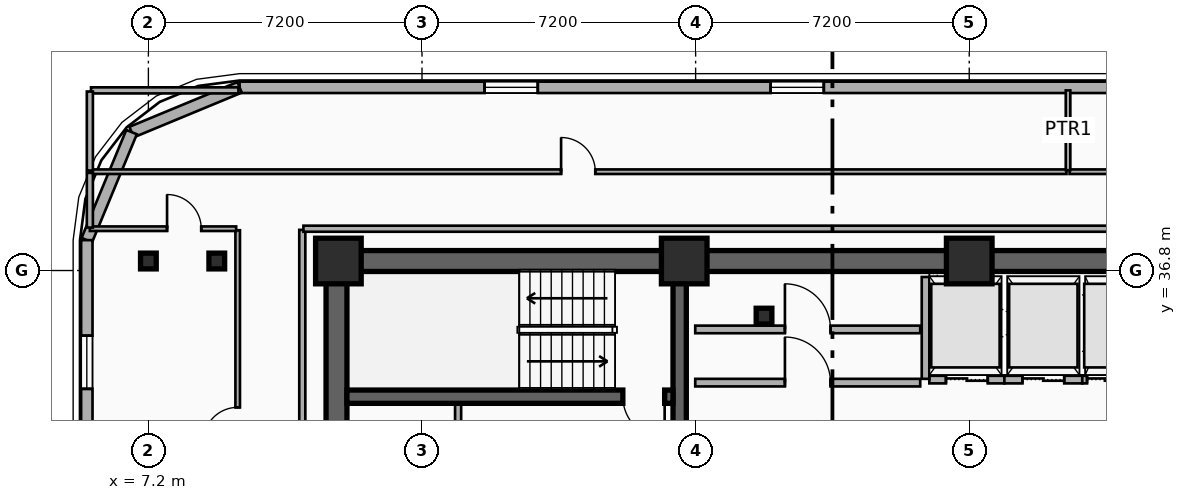
"""IFC4 building model, lengths in metres.
Left out: names, types, materials, properties, quantities, classifications, styles, units other than length and angle.
Written with IfcOpenShell. Run it as: python <this file> out.ifc"""

import sys

from ifc_helpers import new_model, si_unit, direction, frame, frame_2d, origin, origin_2d, place, context, subcontext, project, spatial, rectangle, i_section, extrude, element, fill, save


model = new_model("IFC4")
c1 = context("Model", 3, precision=1e-05, world=origin(), true_north=direction((0.0, 1.0)))
c2 = subcontext(c1, "Body", "Model", "MODEL_VIEW")
j1 = project(units=[si_unit("LENGTHUNIT", "METRE"), si_unit("PLANEANGLEUNIT", "RADIAN")], contexts=[c1])
p1 = place(None, origin())
s1 = spatial("IfcSite", under=j1, at=p1, CompositionType="ELEMENT")
p2 = place(p1, origin())
s2 = spatial("IfcBuilding", under=s1, at=p2, CompositionType="ELEMENT")
p3 = place(p2, frame((0.0, 0.0, 173.2)))
s3 = spatial("IfcBuildingStorey", under=s2, at=p3, CompositionType="ELEMENT", Elevation=173.2)
p4 = place(p3, frame((12.15, 37.05, 0.0), z_axis=(0.0, 0.0, 1.0), x_axis=(1.0, 0.0, 0.0)))
e1 = element("IfcWall", 1, at=p4, inside=s3, PredefinedType="SHEAR", context=c2, shape_type="SweptSolid", body=[
    extrude(rectangle(XDim=33.23, YDim=0.55, at=frame_2d((16.615, 0.0))), origin(), (0.0, 0.0, 1.0), 3.55),
])
p5 = place(p3, frame((12.15, 28.095, 0.0), z_axis=(0.0, 0.0, 1.0), x_axis=(0.0, 1.0, 0.0)))
e2 = element("IfcWall", 2, at=p5, inside=s3, PredefinedType="SHEAR", context=c2, shape_type="SweptSolid", body=[
    extrude(rectangle(XDim=8.68, YDim=0.55, at=frame_2d((4.34, 0.0))), origin(), (0.0, 0.0, 1.0), 3.55),
])
p6 = place(p3, frame((21.18, 28.095, 0.0), z_axis=(0.0, 0.0, 1.0), x_axis=(0.0, 1.0, 0.0)))
e3 = element("IfcWall", 3, at=p6, inside=s3, PredefinedType="SHEAR", context=c2, shape_type="SweptSolid", body=[
    extrude(rectangle(XDim=8.68, YDim=0.35, at=frame_2d((4.34, 0.0))), origin(), (0.0, 0.0, 1.0), 3.55),
])
p7 = place(p3, frame((21.005, 33.48, 0.0), z_axis=(0.0, 0.0, 1.0), x_axis=(-1.0, 0.0, 0.0)))
e4 = element("IfcWall", 4, at=p7, inside=s3, PredefinedType="SHEAR", context=c2, shape_type="SweptSolid", body=[
    extrude(rectangle(XDim=8.58, YDim=0.35, at=frame_2d((4.29, 0.0))), origin(), (0.0, 0.0, 1.0), 3.55),
])
p8 = place(p7, frame((0.22, 0.0, 0.0)))
e5 = element("IfcOpeningElement", 5, at=p8, cuts=e4, PredefinedType="OPENING", context=c2, shape_type="SweptSolid", body=[
    extrude(rectangle(XDim=1.1, YDim=2.15, at=frame_2d((0.55, 1.075))), frame((0.0, 0.185, 0.0), z_axis=(0.0, -1.0, 0.0), x_axis=(1.0, 0.0, 0.0)), (0.0, 0.0, 1.0), 0.37),
])
p9 = place(p3, frame((23.4, 35.6, 0.0), z_axis=(0.0, 0.0, 1.0), x_axis=(1.0, 0.0, 0.0)))
e6 = element("IfcColumn", 6, at=p9, inside=s3, PredefinedType="COLUMN", context=c2, shape_type="SweptSolid", body=[
    extrude(i_section(OverallWidth=0.413, OverallDepth=0.415, WebThickness=0.03, FlangeThickness=0.047, FilletRadius=0.015, at=origin_2d()), origin(), (0.0, 0.0, 1.0), 3.55),
])
for number, where, z_axis, x_axis in (
    (7, (12.2, 37.05, 0.0), (0.0, 0.0, 1.0), (1.0, 0.0, 0.0)),
    (8, (21.3, 37.05, 0.0), (0.0, 0.0, 1.0), (1.0, 0.0, 0.0)),
    (9, (28.8, 37.05, 0.0), (0.0, 0.0, 1.0), (1.0, 0.0, 0.0)),
):
    element("IfcColumn", number, at=place(p3, frame(where, z_axis=z_axis, x_axis=x_axis)), inside=s3, PredefinedType="COLUMN", context=c2, shape_type="SweptSolid", body=[
        extrude(rectangle(XDim=1.2, YDim=1.2, at=origin_2d()), origin(), (0.0, 0.0, 1.0), 3.55),
    ])
for number, where, z_axis, x_axis in (
    (10, (9.0, 37.05, 0.0), (0.0, 0.0, 1.0), (1.0, 0.0, 0.0)),
    (11, (7.2, 37.05, 0.0), (0.0, 0.0, 1.0), (1.0, 0.0, 0.0)),
):
    element("IfcColumn", number, at=place(p3, frame(where, z_axis=z_axis, x_axis=x_axis)), inside=s3, PredefinedType="COLUMN", context=c2, shape_type="SweptSolid", body=[
        extrude(i_section(OverallWidth=0.413, OverallDepth=0.415, WebThickness=0.03, FlangeThickness=0.047, FilletRadius=0.015, at=origin_2d()), origin(), (0.0, 0.0, 1.0), 3.55),
    ])
p10 = place(p3, frame((9.6, 41.62, 0.0), z_axis=(0.0, 0.0, 1.0), x_axis=(1.0, 0.0, 0.0)))
e12 = element("IfcWall", 12, at=p10, inside=s3, PredefinedType="SOLIDWALL", context=c2, shape_type="SweptSolid", body=[
    extrude(rectangle(XDim=38.4, YDim=0.3, at=frame_2d((19.2, 0.0))), origin(), (0.0, 0.0, 1.0), 3.29),
])
p11 = place(p10, frame((6.447, 0.0, 0.75)))
e13 = element("IfcOpeningElement", 13, at=p11, cuts=e12, PredefinedType="OPENING", context=c2, shape_type="SweptSolid", body=[
    extrude(rectangle(XDim=1.4, YDim=2.1, at=frame_2d((0.7, 1.05))), frame((0.0, 0.16, 0.0), z_axis=(0.0, -1.0, 0.0), x_axis=(1.0, 0.0, 0.0)), (0.0, 0.0, 1.0), 0.32),
])
p12 = place(p10, frame((13.973, 0.0, 0.75)))
e14 = element("IfcOpeningElement", 14, at=p12, cuts=e12, PredefinedType="OPENING", context=c2, shape_type="SweptSolid", body=[
    extrude(rectangle(XDim=1.4, YDim=2.1, at=frame_2d((0.7, 1.05))), frame((0.0, 0.16, 0.0), z_axis=(0.0, -1.0, 0.0), x_axis=(1.0, 0.0, 0.0)), (0.0, 0.0, 1.0), 0.32),
])
p13 = place(p10, frame((26.493, 0.0, 0.75)))
e15 = element("IfcOpeningElement", 15, at=p13, cuts=e12, PredefinedType="OPENING", context=c2, shape_type="SweptSolid", body=[
    extrude(rectangle(XDim=1.4, YDim=2.1, at=frame_2d((0.7, 1.05))), frame((0.0, 0.16, 0.0), z_axis=(0.0, -1.0, 0.0), x_axis=(1.0, 0.0, 0.0)), (0.0, 0.0, 1.0), 0.32),
])
p14 = place(p10, frame((32.287, 0.0, 0.75)))
e16 = element("IfcOpeningElement", 16, at=p14, cuts=e12, PredefinedType="OPENING", context=c2, shape_type="SweptSolid", body=[
    extrude(rectangle(XDim=1.4, YDim=2.1, at=frame_2d((0.7, 1.05))), frame((0.0, 0.16, 0.0), z_axis=(0.0, -1.0, 0.0), x_axis=(1.0, 0.0, 0.0)), (0.0, 0.0, 1.0), 0.32),
])
p15 = place(p3, frame((6.757, 40.443, 0.0), z_axis=(0.0, 0.0, 1.0), x_axis=(0.923882414032, 0.382676475685, 0.0)))
e17 = element("IfcWall", 17, at=p15, inside=s3, PredefinedType="SOLIDWALL", context=c2, shape_type="SweptSolid", body=[
    extrude(rectangle(XDim=3.077, YDim=0.3, at=frame_2d((1.539, 0.0))), origin(), (0.0, 0.0, 1.0), 3.29),
])
p16 = place(p3, frame((5.58, 37.6, 0.0), z_axis=(0.0, 0.0, 1.0), x_axis=(0.382636798336, 0.92389884758, 0.0)))
e18 = element("IfcWall", 18, at=p16, inside=s3, PredefinedType="SOLIDWALL", context=c2, shape_type="SweptSolid", body=[
    extrude(rectangle(XDim=3.077, YDim=0.3, at=frame_2d((1.538, 0.0))), origin(), (0.0, 0.0, 1.0), 3.29),
])
p17 = place(p3, frame((5.58, 14.6, 0.0), z_axis=(0.0, 0.0, 1.0), x_axis=(0.0, 1.0, 0.0)))
e19 = element("IfcWall", 19, at=p17, inside=s3, PredefinedType="SOLIDWALL", context=c2, shape_type="SweptSolid", body=[
    extrude(rectangle(XDim=23.0, YDim=0.3, at=frame_2d((11.5, 0.0))), origin(), (0.0, 0.0, 1.0), 3.29),
])
p18 = place(p17, frame((15.493, 0.0, 0.34)))
e20 = element("IfcOpeningElement", 20, at=p18, cuts=e19, PredefinedType="OPENING", context=c2, shape_type="SweptSolid", body=[
    extrude(rectangle(XDim=1.4, YDim=2.1, at=frame_2d((0.7, 1.05))), frame((0.0, 0.16, 0.0), z_axis=(0.0, -1.0, 0.0), x_axis=(1.0, 0.0, 0.0)), (0.0, 0.0, 1.0), 0.32),
])
p19 = place(p17, frame((19.087, 0.0, 0.34)))
e21 = element("IfcOpeningElement", 21, at=p19, cuts=e19, PredefinedType="OPENING", context=c2, shape_type="SweptSolid", body=[
    extrude(rectangle(XDim=1.4, YDim=2.1, at=frame_2d((0.7, 1.05))), frame((0.0, 0.16, 0.0), z_axis=(0.0, -1.0, 0.0), x_axis=(1.0, 0.0, 0.0)), (0.0, 0.0, 1.0), 0.32),
])
p20 = place(p17, frame((2.83, 0.0, 0.34)))
e22 = element("IfcOpeningElement", 22, at=p20, cuts=e19, PredefinedType="OPENING", context=c2, shape_type="SweptSolid", body=[
    extrude(rectangle(XDim=1.4, YDim=2.1, at=frame_2d((0.7, 1.05))), frame((0.0, 0.16, 0.0), z_axis=(0.0, -1.0, 0.0), x_axis=(1.0, 0.0, 0.0)), (0.0, 0.0, 1.0), 0.32),
])
p21 = place(p17, frame((6.74, 0.0, 0.34)))
e23 = element("IfcOpeningElement", 23, at=p21, cuts=e19, PredefinedType="OPENING", context=c2, shape_type="SweptSolid", body=[
    extrude(rectangle(XDim=1.4, YDim=2.1, at=frame_2d((0.7, 1.05))), frame((0.0, 0.16, 0.0), z_axis=(0.0, -1.0, 0.0), x_axis=(1.0, 0.0, 0.0)), (0.0, 0.0, 1.0), 0.32),
])
p22 = place(p3, frame((27.75, 33.93, 0.0), z_axis=(0.0, 0.0, 1.0), x_axis=(1.0, 0.0, 0.0)))
e24 = element("IfcWall", 24, at=p22, inside=s3, PredefinedType="PARTITIONING", context=c2, shape_type="SweptSolid", body=[
    extrude(rectangle(XDim=1.975, YDim=0.2, at=frame_2d((0.988, 0.0))), origin(), (0.0, 0.0, 1.0), 2.36),
])
p23 = place(p22, frame((0.438, 0.0, 0.0)))
e25 = element("IfcOpeningElement", 25, at=p23, cuts=e24, PredefinedType="OPENING", context=c2, shape_type="SweptSolid", body=[
    extrude(rectangle(XDim=1.1, YDim=2.15, at=frame_2d((0.55, 1.075))), frame((0.0, 0.11, 0.0), z_axis=(0.0, -1.0, 0.0), x_axis=(1.0, 0.0, 0.0)), (0.0, 0.0, 1.0), 0.22),
])
p24 = place(p3, frame((27.65, 33.95, 0.0), z_axis=(0.0, 0.0, 1.0), x_axis=(0.0, 1.0, 0.0)))
e26 = element("IfcWall", 26, at=p24, inside=s3, PredefinedType="PARTITIONING", context=c2, shape_type="SweptSolid", body=[
    extrude(rectangle(XDim=2.68, YDim=0.2, at=frame_2d((1.34, 0.0))), origin(), (0.0, 0.0, 1.0), 2.36),
])
p25 = place(p3, frame((29.725, 33.93, 0.0), z_axis=(0.0, 0.0, 1.0), x_axis=(1.0, 0.0, 0.0)))
e27 = element("IfcWall", 27, at=p25, inside=s3, PredefinedType="PARTITIONING", context=c2, shape_type="SweptSolid", body=[
    extrude(rectangle(XDim=2.05, YDim=0.2, at=frame_2d((1.025, 0.0))), origin(), (0.0, 0.0, 1.0), 3.29),
])
p26 = place(p25, frame((0.475, 0.0, 0.0)))
e28 = element("IfcOpeningElement", 28, at=p26, cuts=e27, PredefinedType="OPENING", context=c2, shape_type="SweptSolid", body=[
    extrude(rectangle(XDim=1.1, YDim=2.15, at=frame_2d((0.55, 1.075))), frame((0.0, 0.11, 0.0), z_axis=(0.0, -1.0, 0.0), x_axis=(1.0, 0.0, 0.0)), (0.0, 0.0, 1.0), 0.22),
])
p27 = place(p3, frame((31.775, 33.93, 0.0), z_axis=(0.0, 0.0, 1.0), x_axis=(1.0, 0.0, 0.0)))
e29 = element("IfcWall", 29, at=p27, inside=s3, PredefinedType="PARTITIONING", context=c2, shape_type="SweptSolid", body=[
    extrude(rectangle(XDim=1.2, YDim=0.2, at=frame_2d((0.6, 0.0))), origin(), (0.0, 0.0, 1.0), 3.29),
])
p28 = place(p27, frame((0.125, 0.0, 0.0)))
e30 = element("IfcOpeningElement", 30, at=p28, cuts=e29, PredefinedType="OPENING", context=c2, shape_type="SweptSolid", body=[
    extrude(rectangle(XDim=0.95, YDim=2.15, at=frame_2d((0.475, 1.075))), frame((0.0, 0.11, 0.0), z_axis=(0.0, -1.0, 0.0), x_axis=(1.0, 0.0, 0.0)), (0.0, 0.0, 1.0), 0.22),
])
p29 = place(p3, frame((21.59, 33.85, 0.0), z_axis=(0.0, 0.0, 1.0), x_axis=(1.0, 0.0, 0.0)))
e31 = element("IfcWall", 31, at=p29, inside=s3, PredefinedType="PARTITIONING", context=c2, shape_type="SweptSolid", body=[
    extrude(rectangle(XDim=5.92, YDim=0.2, at=frame_2d((2.96, 0.0))), origin(), (0.0, 0.0, 1.0), 2.36),
])
p30 = place(p29, frame((2.36, 0.0, 0.0)))
e32 = element("IfcOpeningElement", 32, at=p30, cuts=e31, PredefinedType="OPENING", context=c2, shape_type="SweptSolid", body=[
    extrude(rectangle(XDim=1.2, YDim=2.15, at=frame_2d((0.6, 1.075))), frame((0.0, 0.11, 0.0), z_axis=(0.0, -1.0, 0.0), x_axis=(1.0, 0.0, 0.0)), (0.0, 0.0, 1.0), 0.22),
])
p31 = place(p3, frame((21.59, 35.25, 0.0), z_axis=(0.0, 0.0, 1.0), x_axis=(1.0, 0.0, 0.0)))
e33 = element("IfcWall", 33, at=p31, inside=s3, PredefinedType="PARTITIONING", context=c2, shape_type="SweptSolid", body=[
    extrude(rectangle(XDim=5.92, YDim=0.2, at=frame_2d((2.96, 0.0))), origin(), (0.0, 0.0, 1.0), 2.36),
])
p32 = place(p31, frame((2.36, 0.0, 0.0)))
e34 = element("IfcOpeningElement", 34, at=p32, cuts=e33, PredefinedType="OPENING", context=c2, shape_type="SweptSolid", body=[
    extrude(rectangle(XDim=1.2, YDim=2.15, at=frame_2d((0.6, 1.075))), frame((0.0, 0.11, 0.0), z_axis=(0.0, -1.0, 0.0), x_axis=(1.0, 0.0, 0.0)), (0.0, 0.0, 1.0), 0.22),
])
p33 = place(p3, frame((9.55, 27.64, 0.0), z_axis=(0.0, 0.0, 1.0), x_axis=(0.0, 1.0, 0.0)))
e35 = element("IfcWall", 35, at=p33, inside=s3, PredefinedType="PARTITIONING", context=c2, shape_type="SweptSolid", body=[
    extrude(rectangle(XDim=10.22, YDim=0.12, at=frame_2d((5.11, 0.0))), origin(), (0.0, 0.0, 1.0), 2.77),
])
p34 = place(p33, frame((4.66, 0.0, 0.0)))
e36 = element("IfcOpeningElement", 36, at=p34, cuts=e35, PredefinedType="OPENING", context=c2, shape_type="SweptSolid", body=[
    extrude(rectangle(XDim=0.9, YDim=2.1, at=frame_2d((0.45, 1.05))), frame((0.0, 0.07, 0.0), z_axis=(0.0, -1.0, 0.0), x_axis=(1.0, 0.0, 0.0)), (0.0, 0.0, 1.0), 0.14),
])
p35 = place(p3, frame((5.66, 37.9, 0.0), z_axis=(0.0, 0.0, 1.0), x_axis=(1.0, 0.0, 0.0)))
e37 = element("IfcWall", 37, at=p35, inside=s3, PredefinedType="PARTITIONING", context=c2, shape_type="SweptSolid", body=[
    extrude(rectangle(XDim=3.85, YDim=0.12, at=frame_2d((1.925, 0.0))), origin(), (0.0, 0.0, 1.0), 3.29),
])
p36 = place(p35, frame((2.031, 0.0, 0.0)))
e38 = element("IfcOpeningElement", 38, at=p36, cuts=e37, PredefinedType="OPENING", context=c2, shape_type="SweptSolid", body=[
    extrude(rectangle(XDim=0.9, YDim=2.1, at=frame_2d((0.45, 1.05))), frame((0.0, 0.07, 0.0), z_axis=(0.0, -1.0, 0.0), x_axis=(1.0, 0.0, 0.0)), (0.0, 0.0, 1.0), 0.14),
])
p37 = place(p3, frame((5.66, 39.4, 0.0), z_axis=(0.0, 0.0, 1.0), x_axis=(1.0, 0.0, 0.0)))
e39 = element("IfcWall", 39, at=p37, inside=s3, PredefinedType="PARTITIONING", context=c2, shape_type="SweptSolid", body=[
    extrude(rectangle(XDim=25.7, YDim=0.12, at=frame_2d((12.85, 0.0))), origin(), (0.0, 0.0, 1.0), 3.29),
])
p38 = place(p37, frame((12.4, 0.0, 0.0)))
e40 = element("IfcOpeningElement", 40, at=p38, cuts=e39, PredefinedType="OPENING", context=c2, shape_type="SweptSolid", body=[
    extrude(rectangle(XDim=0.9, YDim=2.1, at=frame_2d((0.45, 1.05))), frame((0.0, 0.07, 0.0), z_axis=(0.0, -1.0, 0.0), x_axis=(1.0, 0.0, 0.0)), (0.0, 0.0, 1.0), 0.14),
])
p39 = place(p3, frame((31.44, 39.4, 0.0), z_axis=(0.0, 0.0, 1.0), x_axis=(1.0, 0.0, 0.0)))
e41 = element("IfcWall", 41, at=p39, inside=s3, PredefinedType="PARTITIONING", context=c2, shape_type="SweptSolid", body=[
    extrude(rectangle(XDim=20.5, YDim=0.12, at=frame_2d((10.25, 0.0))), origin(), (0.0, 0.0, 1.0), 3.29),
])
p40 = place(p39, frame((9.8, 0.0, 0.0)))
e42 = element("IfcOpeningElement", 42, at=p40, cuts=e41, PredefinedType="OPENING", context=c2, shape_type="SweptSolid", body=[
    extrude(rectangle(XDim=0.9, YDim=2.1, at=frame_2d((0.45, 1.05))), frame((0.0, 0.07, 0.0), z_axis=(0.0, -1.0, 0.0), x_axis=(1.0, 0.0, 0.0)), (0.0, 0.0, 1.0), 0.14),
])
p41 = place(p3, frame((31.4, 39.44, 0.0), z_axis=(0.0, 0.0, 1.0), x_axis=(0.0, 1.0, 0.0)))
e43 = element("IfcWall", 43, at=p41, inside=s3, PredefinedType="PARTITIONING", context=c2, shape_type="SweptSolid", body=[
    extrude(rectangle(XDim=2.1, YDim=0.12, at=frame_2d((1.05, 0.0))), origin(), (0.0, 0.0, 1.0), 3.29),
])
p42 = place(p3, frame((15.35, 30.96, 0.0), z_axis=(0.0, 0.0, 1.0), x_axis=(0.0, 1.0, 0.0)))
e44 = element("IfcWall", 44, at=p42, inside=s3, PredefinedType="PARTITIONING", context=c2, shape_type="SweptSolid", body=[
    extrude(rectangle(XDim=2.31, YDim=0.16, at=frame_2d((1.155, 0.0))), origin(), (0.0, 0.0, 1.0), 3.29),
])
p43 = place(p3, frame((11.25, 27.63, 0.0), z_axis=(0.0, 0.0, 1.0), x_axis=(0.0, 1.0, 0.0)))
e45 = element("IfcWall", 45, at=p43, inside=s3, PredefinedType="PARTITIONING", context=c2, shape_type="SweptSolid", body=[
    extrude(rectangle(XDim=10.24, YDim=0.16, at=frame_2d((5.12, 0.0))), origin(), (0.0, 0.0, 1.0), 2.77),
])
p44 = place(p3, frame((11.28, 37.9, 0.0), z_axis=(0.0, 0.0, 1.0), x_axis=(1.0, 0.0, 0.0)))
e46 = element("IfcWall", 46, at=p44, inside=s3, PredefinedType="PARTITIONING", context=c2, shape_type="SweptSolid", body=[
    extrude(rectangle(XDim=35.04, YDim=0.16, at=frame_2d((17.52, 0.0))), origin(), (0.0, 0.0, 1.0), 3.29),
])
p45 = place(p3, frame((5.66, 37.93, 0.0), z_axis=(0.0, 0.0, 1.0), x_axis=(0.0, 1.0, 0.0)))
e47 = element("IfcWall", 47, at=p45, inside=s3, PredefinedType="PARTITIONING", context=c2, shape_type="SweptSolid", body=[
    extrude(rectangle(XDim=1.44, YDim=0.16, at=frame_2d((0.72, 0.0))), origin(), (0.0, 0.0, 1.0), 3.29),
])
p46 = place(p3, frame((5.69, 41.54, 0.0), z_axis=(0.0, 0.0, 1.0), x_axis=(1.0, 0.0, 0.0)))
e48 = element("IfcWall", 48, at=p46, inside=s3, PredefinedType="PARTITIONING", context=c2, shape_type="SweptSolid", body=[
    extrude(rectangle(XDim=3.88, YDim=0.16, at=frame_2d((1.94, 0.0))), origin(), (0.0, 0.0, 1.0), 3.29),
])
p47 = place(p3, frame((5.66, 39.43, 0.0), z_axis=(0.0, 0.0, 1.0), x_axis=(0.0, 1.0, 0.0)))
e49 = element("IfcWall", 49, at=p47, inside=s3, PredefinedType="PARTITIONING", context=c2, shape_type="SweptSolid", body=[
    extrude(rectangle(XDim=2.08, YDim=0.16, at=frame_2d((1.04, 0.0))), origin(), (0.0, 0.0, 1.0), 3.29),
])
p48 = place(p11, origin())
e50 = element("IfcWindow", 50, at=p48, inside=s3, PartitioningType="SINGLE_PANEL", PredefinedType="WINDOW", context=c2, shape_type="SweptSolid", body=[
    extrude(rectangle(XDim=1.4, YDim=2.1, at=frame_2d((0.7, 1.05))), frame((0.0, 0.03, 0.0), z_axis=(0.0, -1.0, 0.0), x_axis=(1.0, 0.0, 0.0)), (0.0, 0.0, 1.0), 0.06),
])
fill(e13, e50)
p49 = place(p12, origin())
e51 = element("IfcWindow", 51, at=p49, inside=s3, PartitioningType="SINGLE_PANEL", PredefinedType="WINDOW", context=c2, shape_type="SweptSolid", body=[
    extrude(rectangle(XDim=1.4, YDim=2.1, at=frame_2d((0.7, 1.05))), frame((0.0, 0.03, 0.0), z_axis=(0.0, -1.0, 0.0), x_axis=(1.0, 0.0, 0.0)), (0.0, 0.0, 1.0), 0.06),
])
fill(e14, e51)
p50 = place(p19, origin())
e52 = element("IfcWindow", 52, at=p50, inside=s3, PartitioningType="SINGLE_PANEL", PredefinedType="WINDOW", context=c2, shape_type="SweptSolid", body=[
    extrude(rectangle(XDim=1.4, YDim=2.1, at=frame_2d((0.7, 1.05))), frame((0.0, 0.03, 0.0), z_axis=(0.0, -1.0, 0.0), x_axis=(1.0, 0.0, 0.0)), (0.0, 0.0, 1.0), 0.06),
])
fill(e21, e52)
p51 = place(p23, origin())
e53 = element("IfcDoor", 53, at=p51, inside=s3, OperationType="DOUBLE_DOOR_SLIDING", PredefinedType="DOOR", context=c2, shape_type="SweptSolid", body=[
    extrude(rectangle(XDim=1.1, YDim=2.15, at=frame_2d((0.55, 1.075))), frame((0.0, 0.025, 0.0), z_axis=(0.0, -1.0, 0.0), x_axis=(1.0, 0.0, 0.0)), (0.0, 0.0, 1.0), 0.05),
])
fill(e25, e53)
p52 = place(p26, origin())
e54 = element("IfcDoor", 54, at=p52, inside=s3, OperationType="DOUBLE_DOOR_SLIDING", PredefinedType="DOOR", context=c2, shape_type="SweptSolid", body=[
    extrude(rectangle(XDim=1.1, YDim=2.15, at=frame_2d((0.55, 1.075))), frame((0.0, 0.025, 0.0), z_axis=(0.0, -1.0, 0.0), x_axis=(1.0, 0.0, 0.0)), (0.0, 0.0, 1.0), 0.05),
])
fill(e28, e54)
p53 = place(p28, origin())
e55 = element("IfcDoor", 55, at=p53, inside=s3, OperationType="DOUBLE_DOOR_SLIDING", PredefinedType="DOOR", context=c2, shape_type="SweptSolid", body=[
    extrude(rectangle(XDim=0.95, YDim=2.15, at=frame_2d((0.475, 1.075))), frame((0.0, 0.025, 0.0), z_axis=(0.0, -1.0, 0.0), x_axis=(1.0, 0.0, 0.0)), (0.0, 0.0, 1.0), 0.05),
])
fill(e30, e55)
p54 = place(p8, origin())
e56 = element("IfcDoor", 56, at=p54, inside=s3, OperationType="SINGLE_SWING_LEFT", PredefinedType="DOOR", context=c2, shape_type="SweptSolid", body=[
    extrude(rectangle(XDim=1.1, YDim=2.15, at=frame_2d((0.55, 1.075))), frame((0.0, 0.025, 0.0), z_axis=(0.0, -1.0, 0.0), x_axis=(1.0, 0.0, 0.0)), (0.0, 0.0, 1.0), 0.05),
])
fill(e5, e56)
p55 = place(p30, origin())
e57 = element("IfcDoor", 57, at=p55, inside=s3, OperationType="SINGLE_SWING_LEFT", PredefinedType="DOOR", context=c2, shape_type="SweptSolid", body=[
    extrude(rectangle(XDim=1.2, YDim=2.15, at=frame_2d((0.6, 1.075))), frame((0.0, 0.025, 0.0), z_axis=(0.0, -1.0, 0.0), x_axis=(1.0, 0.0, 0.0)), (0.0, 0.0, 1.0), 0.05),
])
fill(e32, e57)
p56 = place(p32, origin())
e58 = element("IfcDoor", 58, at=p56, inside=s3, OperationType="SINGLE_SWING_LEFT", PredefinedType="DOOR", context=c2, shape_type="SweptSolid", body=[
    extrude(rectangle(XDim=1.2, YDim=2.15, at=frame_2d((0.6, 1.075))), frame((0.0, 0.025, 0.0), z_axis=(0.0, -1.0, 0.0), x_axis=(1.0, 0.0, 0.0)), (0.0, 0.0, 1.0), 0.05),
])
fill(e34, e58)
p57 = place(p34, origin())
e59 = element("IfcDoor", 59, at=p57, inside=s3, OperationType="SINGLE_SWING_LEFT", PredefinedType="DOOR", context=c2, shape_type="SweptSolid", body=[
    extrude(rectangle(XDim=0.9, YDim=2.1, at=frame_2d((0.45, 1.05))), frame((0.0, 0.025, 0.0), z_axis=(0.0, -1.0, 0.0), x_axis=(1.0, 0.0, 0.0)), (0.0, 0.0, 1.0), 0.05),
])
fill(e36, e59)
p58 = place(p36, origin())
e60 = element("IfcDoor", 60, at=p58, inside=s3, OperationType="SINGLE_SWING_LEFT", PredefinedType="DOOR", context=c2, shape_type="SweptSolid", body=[
    extrude(rectangle(XDim=0.9, YDim=2.1, at=frame_2d((0.45, 1.05))), frame((0.0, 0.025, 0.0), z_axis=(0.0, -1.0, 0.0), x_axis=(1.0, 0.0, 0.0)), (0.0, 0.0, 1.0), 0.05),
])
fill(e38, e60)
p59 = place(p38, origin())
e61 = element("IfcDoor", 61, at=p59, inside=s3, OperationType="SINGLE_SWING_LEFT", PredefinedType="DOOR", context=c2, shape_type="SweptSolid", body=[
    extrude(rectangle(XDim=0.9, YDim=2.1, at=frame_2d((0.45, 1.05))), frame((0.0, 0.025, 0.0), z_axis=(0.0, -1.0, 0.0), x_axis=(1.0, 0.0, 0.0)), (0.0, 0.0, 1.0), 0.05),
])
fill(e40, e61)
save(model, sys.argv[1])
